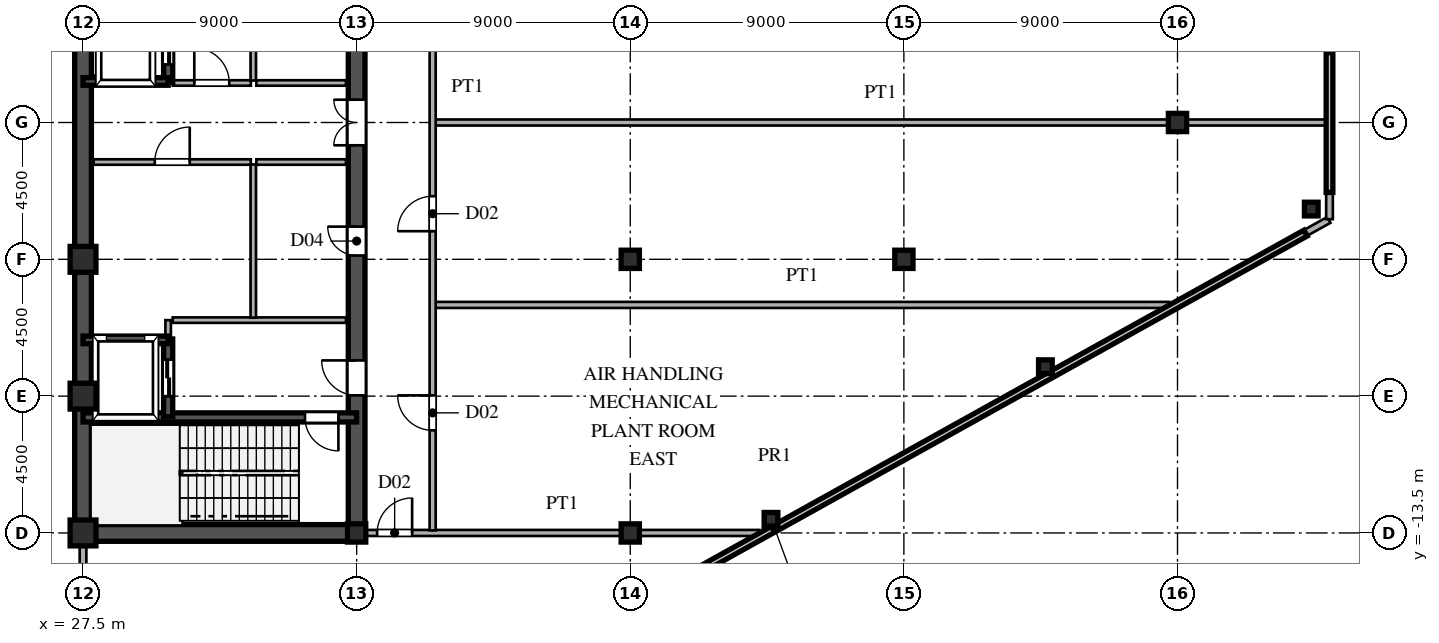
"""IFC4 building model, lengths in metres.
Left out: names, types, materials, properties, quantities, classifications, styles, units other than length and angle.
Written with IfcOpenShell. Run it as: python <this file> out.ifc"""

import sys

from ifc_helpers import new_model, si_unit, direction, frame, frame_2d, origin, origin_2d, place, context, subcontext, project, spatial, rectangle, hollow_rectangle, i_section, extrude, source, transform, mapped, element, fill, save


model = new_model("IFC4")
c1 = context("Model", 3, precision=1e-05, world=origin(), true_north=direction((0.0, 1.0)))
c2 = subcontext(c1, "Body", "Model", "MODEL_VIEW")
j1 = project(units=[si_unit("LENGTHUNIT", "METRE"), si_unit("PLANEANGLEUNIT", "RADIAN")], contexts=[c1])
p1 = place(None, origin())
s1 = spatial("IfcSite", under=j1, at=p1, CompositionType="ELEMENT")
p2 = place(p1, origin())
s2 = spatial("IfcBuilding", under=s1, at=p2, CompositionType="ELEMENT")
p3 = place(p2, frame((0.0, 0.0, 162.0)))
s3 = spatial("IfcBuildingStorey", under=s2, at=p3, CompositionType="ELEMENT", Elevation=162.0)
m1 = source(origin(), c2, "Body", "SweptSolid", [
    extrude(hollow_rectangle(XDim=0.85, YDim=0.85, WallThickness=0.036, at=origin_2d()), origin(), (0.0, 0.0, 1.0), 5.1),
])
for number, where, z_axis, x_axis in (
    (1, (27.5, -13.5, 0.0), (0.0, 0.0, 1.0), (1.0, 0.0, 0.0)),
    (2, (27.5, -9.0, 0.0), (0.0, 0.0, 1.0), (1.0, 0.0, 0.0)),
    (3, (27.5, -4.5, 0.0), (0.0, 0.0, 1.0), (1.0, 0.0, 0.0)),
):
    element("IfcColumn", number, at=place(p3, frame(where, z_axis=z_axis, x_axis=x_axis)), inside=s3, PredefinedType="COLUMN", context=c2, shape_type="MappedRepresentation", body=[
        mapped(m1, transform((0.0, 0.0, 0.0), scale=1.0)),
    ])
m2 = source(origin(), c2, "Body", "SweptSolid", [
    extrude(i_section(OverallWidth=0.6, OverallDepth=0.6, WebThickness=0.025, FlangeThickness=0.04, at=origin_2d()), origin(), (0.0, 0.0, 1.0), 5.1),
])
for number, where, z_axis, x_axis in (
    (4, (36.5, -13.5, 0.0), (0.0, 0.0, 1.0), (1.0, 0.0, 0.0)),
    (5, (45.5, -13.5, 0.0), (0.0, 0.0, 1.0), (1.0, 0.0, 0.0)),
    (6, (45.5, -4.5, 0.0), (0.0, 0.0, 1.0), (1.0, 0.0, 0.0)),
    (7, (54.5, -4.5, 0.0), (0.0, 0.0, 1.0), (1.0, 0.0, 0.0)),
    (8, (63.5, 0.0, 0.0), (0.0, 0.0, 1.0), (1.0, 0.0, 0.0)),
):
    element("IfcColumn", number, at=place(p3, frame(where, z_axis=z_axis, x_axis=x_axis)), inside=s3, PredefinedType="COLUMN", context=c2, shape_type="MappedRepresentation", body=[
        mapped(m2, transform((0.0, 0.0, 0.0), scale=1.0)),
    ])
m3 = source(origin(), c2, "Body", "SweptSolid", [
    extrude(hollow_rectangle(XDim=0.45, YDim=0.45, WallThickness=0.018, at=origin_2d()), origin(), (0.0, 0.0, 1.0), 5.1),
])
for number, where, z_axis, x_axis in (
    (9, (67.9, -2.847, 0.0), (0.0, 0.0, 1.0), (1.0, 0.0, 0.0)),
    (10, (50.129, -13.051, 0.0), (0.0, 0.0, 1.0), (1.0, 0.0, 0.0)),
    (11, (59.155, -8.031, 0.0), (0.0, 0.0, 1.0), (1.0, 0.0, 0.0)),
):
    element("IfcColumn", number, at=place(p3, frame(where, z_axis=z_axis, x_axis=x_axis)), inside=s3, PredefinedType="COLUMN", context=c2, shape_type="MappedRepresentation", body=[
        mapped(m3, transform((0.0, 0.0, 0.0), scale=1.0)),
    ])
p4 = place(p3, frame((32.018, -23.49, 0.0), z_axis=(0.0, 0.0, 1.0), x_axis=(0.873930586172, 0.486050748947, 0.0)))
e12 = element("IfcWall", 12, at=p4, inside=s3, PredefinedType="PARAPET", context=c2, shape_type="SweptSolid", body=[
    extrude(rectangle(XDim=41.725, YDim=0.22, at=frame_2d((20.863, 0.0))), origin(), (0.0, 0.0, 1.0), 1.25),
])
p5 = place(p3, frame((68.5, -3.18, 0.0), z_axis=(0.0, 0.0, 1.0), x_axis=(0.0, 1.0, 0.0)))
e13 = element("IfcWall", 13, at=p5, inside=s3, PredefinedType="PARAPET", context=c2, shape_type="SweptSolid", body=[
    extrude(rectangle(XDim=6.36, YDim=0.22, at=frame_2d((3.18, 0.0))), origin(), (0.0, 0.0, 1.0), 1.25),
])
p6 = place(p3, frame((27.5, -17.98, 0.0), z_axis=(0.0, 0.0, 1.0), x_axis=(0.0, 1.0, 0.0)))
e14 = element("IfcWall", 14, at=p6, inside=s3, PredefinedType="PARAPET", context=c2, shape_type="SweptSolid", body=[
    extrude(rectangle(XDim=4.46, YDim=0.22, at=frame_2d((2.23, 0.0))), origin(), (0.0, 0.0, 1.0), 1.25),
])
for number, where, z_axis, x_axis in (
    (15, (27.5, -13.5, 0.0), (0.0, 0.0, 1.0), (0.0, 1.0, 0.0)),
    (16, (27.5, 1.3, 0.0), (0.0, 0.0, 1.0), (0.0, 1.0, 0.0)),
):
    element("IfcWall", number, at=place(p3, frame(where, z_axis=z_axis, x_axis=x_axis)), inside=s3, PredefinedType="SHEAR", context=c2, shape_type="SweptSolid", body=[
        extrude(rectangle(XDim=12.2, YDim=0.55, at=frame_2d((6.1, 0.0))), origin(), (0.0, 0.0, 1.0), 4.88),
    ])
p7 = place(p3, frame((27.5, -1.3, 0.0), z_axis=(0.0, 0.0, 1.0), x_axis=(0.0, 1.0, 0.0)))
e17 = element("IfcWall", 17, at=p7, inside=s3, PredefinedType="SHEAR", context=c2, shape_type="SweptSolid", body=[
    extrude(rectangle(XDim=2.6, YDim=0.55, at=frame_2d((1.3, 0.0))), origin(), (0.0, 0.0, 1.0), 4.88),
])
p8 = place(p3, frame((27.5, -13.5, 0.0), z_axis=(0.0, 0.0, 1.0), x_axis=(1.0, 0.0, 0.0)))
e18 = element("IfcWall", 18, at=p8, inside=s3, PredefinedType="SHEAR", context=c2, shape_type="SweptSolid", body=[
    extrude(rectangle(XDim=9.0, YDim=0.55, at=frame_2d((4.5, 0.0))), origin(), (0.0, 0.0, 1.0), 4.88),
])
p9 = place(p3, frame((36.5, -13.65, 0.0), z_axis=(0.0, 0.0, 1.0), x_axis=(0.0, 1.0, 0.0)))
e19 = element("IfcWall", 19, at=p9, inside=s3, PredefinedType="SHEAR", context=c2, shape_type="SweptSolid", body=[
    extrude(rectangle(XDim=7.15, YDim=0.55, at=frame_2d((3.575, 0.0))), origin(), (0.0, 0.0, 1.0), 4.88),
])
p10 = place(p9, frame((4.675, 0.0, 0.0)))
e20 = element("IfcOpeningElement", 20, at=p10, cuts=e19, PredefinedType="OPENING", context=c2, shape_type="SweptSolid", body=[
    extrude(rectangle(XDim=1.15, YDim=2.2, at=frame_2d((0.575, 1.1))), frame((0.0, 0.285, 0.0), z_axis=(0.0, -1.0, 0.0), x_axis=(1.0, 0.0, 0.0)), (0.0, 0.0, 1.0), 0.57),
])
p11 = place(p3, frame((36.5, -1.3, 0.0), z_axis=(0.0, 0.0, 1.0), x_axis=(0.0, 1.0, 0.0)))
e21 = element("IfcWall", 21, at=p11, inside=s3, PredefinedType="SHEAR", context=c2, shape_type="SweptSolid", body=[
    extrude(rectangle(XDim=2.6, YDim=0.55, at=frame_2d((1.3, 0.0))), origin(), (0.0, 0.0, 1.0), 4.88),
])
p12 = place(p11, frame((0.55, 0.0, 0.0)))
e22 = element("IfcOpeningElement", 22, at=p12, cuts=e21, PredefinedType="OPENING", context=c2, shape_type="SweptSolid", body=[
    extrude(rectangle(XDim=1.5, YDim=2.3, at=frame_2d((0.75, 1.15))), frame((0.0, 0.285, 0.0), z_axis=(0.0, -1.0, 0.0), x_axis=(1.0, 0.0, 0.0)), (0.0, 0.0, 1.0), 0.57),
])
p13 = place(p3, frame((36.5, -6.5, 0.0), z_axis=(0.0, 0.0, 1.0), x_axis=(0.0, 1.0, 0.0)))
e23 = element("IfcWall", 23, at=p13, inside=s3, PredefinedType="SHEAR", context=c2, shape_type="SweptSolid", body=[
    extrude(rectangle(XDim=5.2, YDim=0.55, at=frame_2d((2.6, 0.0))), origin(), (0.0, 0.0, 1.0), 4.88),
])
p14 = place(p13, frame((2.125, 0.0, 0.0)))
e24 = element("IfcOpeningElement", 24, at=p14, cuts=e23, PredefinedType="OPENING", context=c2, shape_type="SweptSolid", body=[
    extrude(rectangle(XDim=0.95, YDim=2.15, at=frame_2d((0.475, 1.075))), frame((0.0, 0.285, 0.0), z_axis=(0.0, -1.0, 0.0), x_axis=(1.0, 0.0, 0.0)), (0.0, 0.0, 1.0), 0.57),
])
p15 = place(p3, frame((36.5, 1.3, 0.0), z_axis=(0.0, 0.0, 1.0), x_axis=(0.0, 1.0, 0.0)))
e25 = element("IfcWall", 25, at=p15, inside=s3, PredefinedType="SHEAR", context=c2, shape_type="SweptSolid", body=[
    extrude(rectangle(XDim=6.9, YDim=0.55, at=frame_2d((3.45, 0.0))), origin(), (0.0, 0.0, 1.0), 4.88),
])
p16 = place(p15, frame((2.975, 0.0, 0.0)))
e26 = element("IfcOpeningElement", 26, at=p16, cuts=e25, PredefinedType="OPENING", context=c2, shape_type="SweptSolid", body=[
    extrude(rectangle(XDim=0.95, YDim=2.15, at=frame_2d((0.475, 1.075))), frame((0.0, 0.285, 0.0), z_axis=(0.0, -1.0, 0.0), x_axis=(1.0, 0.0, 0.0)), (0.0, 0.0, 1.0), 0.57),
])
p17 = place(p3, frame((27.5, -9.7, 0.0), z_axis=(0.0, 0.0, 1.0), x_axis=(1.0, 0.0, 0.0)))
e27 = element("IfcWall", 27, at=p17, inside=s3, PredefinedType="SHEAR", context=c2, shape_type="SweptSolid", body=[
    extrude(rectangle(XDim=9.0, YDim=0.3, at=frame_2d((4.5, 0.0))), origin(), (0.0, 0.0, 1.0), 4.88),
])
p18 = place(p17, frame((7.3, 0.0, 0.0)))
e28 = element("IfcOpeningElement", 28, at=p18, cuts=e27, PredefinedType="OPENING", context=c2, shape_type="SweptSolid", body=[
    extrude(rectangle(XDim=1.1, YDim=2.2, at=frame_2d((0.55, 1.1))), frame((0.0, 0.16, 0.0), z_axis=(0.0, -1.0, 0.0), x_axis=(1.0, 0.0, 0.0)), (0.0, 0.0, 1.0), 0.32),
])
for number, where, z_axis, x_axis in (
    (29, (27.5, -7.15, 0.0), (0.0, 0.0, 1.0), (1.0, 0.0, 0.0)),
    (30, (27.5, 1.35, 0.0), (0.0, 0.0, 1.0), (1.0, 0.0, 0.0)),
):
    element("IfcWall", number, at=place(p3, frame(where, z_axis=z_axis, x_axis=x_axis)), inside=s3, PredefinedType="SHEAR", context=c2, shape_type="SweptSolid", body=[
        extrude(rectangle(XDim=2.8, YDim=0.25, at=frame_2d((1.4, 0.0))), origin(), (0.0, 0.0, 1.0), 4.88),
    ])
p19 = place(p3, frame((30.3, -9.68, 0.0), z_axis=(0.0, 0.0, 1.0), x_axis=(0.0, 1.0, 0.0)))
e31 = element("IfcWall", 31, at=p19, inside=s3, PredefinedType="SHEAR", context=c2, shape_type="SweptSolid", body=[
    extrude(rectangle(XDim=2.56, YDim=0.3, at=frame_2d((1.28, 0.0))), origin(), (0.0, 0.0, 1.0), 4.88),
])
p20 = place(p19, frame((0.68, 0.0, 0.0)))
e32 = element("IfcOpeningElement", 32, at=p20, cuts=e31, PredefinedType="OPENING", context=c2, shape_type="SweptSolid", body=[
    extrude(rectangle(XDim=1.2, YDim=2.25, at=frame_2d((0.6, 1.125))), frame((0.0, 0.16, 0.0), z_axis=(0.0, -1.0, 0.0), x_axis=(1.0, 0.0, 0.0)), (0.0, 0.0, 1.0), 0.32),
])
p21 = place(p3, frame((30.3, 1.32, 0.0), z_axis=(0.0, 0.0, 1.0), x_axis=(0.0, 1.0, 0.0)))
e33 = element("IfcWall", 33, at=p21, inside=s3, PredefinedType="SHEAR", context=c2, shape_type="SweptSolid", body=[
    extrude(rectangle(XDim=2.28, YDim=0.3, at=frame_2d((1.14, 0.0))), origin(), (0.0, 0.0, 1.0), 4.88),
])
p22 = place(p21, frame((0.59, 0.0, 0.0)))
e34 = element("IfcOpeningElement", 34, at=p22, cuts=e33, PredefinedType="OPENING", context=c2, shape_type="SweptSolid", body=[
    extrude(rectangle(XDim=1.1, YDim=2.2, at=frame_2d((0.55, 1.1))), frame((0.0, 0.16, 0.0), z_axis=(0.0, -1.0, 0.0), x_axis=(1.0, 0.0, 0.0)), (0.0, 0.0, 1.0), 0.32),
])
p23 = place(p3, frame((30.45, -6.5, 0.0), z_axis=(0.0, 0.0, 1.0), x_axis=(1.0, 0.0, 0.0)))
e35 = element("IfcWall", 35, at=p23, inside=s3, PredefinedType="PARTITIONING", context=c2, shape_type="SweptSolid", body=[
    extrude(rectangle(XDim=5.7, YDim=0.18, at=frame_2d((2.85, 0.0))), origin(), (0.0, 0.0, 1.0), 4.88),
])
p24 = place(p3, frame((30.3, -7.12, 0.0), z_axis=(0.0, 0.0, 1.0), x_axis=(0.0, 1.0, 0.0)))
e36 = element("IfcWall", 36, at=p24, inside=s3, PredefinedType="PARTITIONING", context=c2, shape_type="SweptSolid", body=[
    extrude(rectangle(XDim=0.62, YDim=0.18, at=frame_2d((0.31, 0.0))), origin(), (0.0, 0.0, 1.0), 4.88),
])
p25 = place(p3, frame((33.1, -6.42, 0.0), z_axis=(0.0, 0.0, 1.0), x_axis=(0.0, 1.0, 0.0)))
e37 = element("IfcWall", 37, at=p25, inside=s3, PredefinedType="PARTITIONING", context=c2, shape_type="SweptSolid", body=[
    extrude(rectangle(XDim=5.04, YDim=0.18, at=frame_2d((2.52, 0.0))), origin(), (0.0, 0.0, 1.0), 4.88),
])
p26 = place(p3, frame((33.1, 1.38, 0.0), z_axis=(0.0, 0.0, 1.0), x_axis=(0.0, 1.0, 0.0)))
e38 = element("IfcWall", 38, at=p26, inside=s3, PredefinedType="PARTITIONING", context=c2, shape_type="SweptSolid", body=[
    extrude(rectangle(XDim=6.74, YDim=0.18, at=frame_2d((3.37, 0.0))), origin(), (0.0, 0.0, 1.0), 4.88),
])
p27 = place(p3, frame((27.85, -1.3, 0.0), z_axis=(0.0, 0.0, 1.0), x_axis=(1.0, 0.0, 0.0)))
e39 = element("IfcWall", 39, at=p27, inside=s3, PredefinedType="PARTITIONING", context=c2, shape_type="SweptSolid", body=[
    extrude(rectangle(XDim=5.17, YDim=0.18, at=frame_2d((2.585, 0.0))), origin(), (0.0, 0.0, 1.0), 4.88),
])
p28 = place(p27, frame((2.01, 0.0, 0.0)))
e40 = element("IfcOpeningElement", 40, at=p28, cuts=e39, PredefinedType="OPENING", context=c2, shape_type="SweptSolid", body=[
    extrude(rectangle(XDim=1.15, YDim=2.2, at=frame_2d((0.575, 1.1))), frame((0.0, 0.1, 0.0), z_axis=(0.0, -1.0, 0.0), x_axis=(1.0, 0.0, 0.0)), (0.0, 0.0, 1.0), 0.2),
])
p29 = place(p3, frame((30.45, 1.3, 0.0), z_axis=(0.0, 0.0, 1.0), x_axis=(1.0, 0.0, 0.0)))
e41 = element("IfcWall", 41, at=p29, inside=s3, PredefinedType="PARTITIONING", context=c2, shape_type="SweptSolid", body=[
    extrude(rectangle(XDim=2.57, YDim=0.18, at=frame_2d((1.285, 0.0))), origin(), (0.0, 0.0, 1.0), 4.88),
])
p30 = place(p29, frame((0.71, 0.0, 0.0)))
e42 = element("IfcOpeningElement", 42, at=p30, cuts=e41, PredefinedType="OPENING", context=c2, shape_type="SweptSolid", body=[
    extrude(rectangle(XDim=1.15, YDim=2.2, at=frame_2d((0.575, 1.1))), frame((0.0, 0.1, 0.0), z_axis=(0.0, -1.0, 0.0), x_axis=(1.0, 0.0, 0.0)), (0.0, 0.0, 1.0), 0.2),
])
for number, where, z_axis, x_axis in (
    (43, (33.2, -1.3, 0.0), (0.0, 0.0, 1.0), (1.0, 0.0, 0.0)),
    (44, (33.2, 1.3, 0.0), (0.0, 0.0, 1.0), (1.0, 0.0, 0.0)),
):
    element("IfcWall", number, at=place(p3, frame(where, z_axis=z_axis, x_axis=x_axis)), inside=s3, PredefinedType="PARTITIONING", context=c2, shape_type="SweptSolid", body=[
        extrude(rectangle(XDim=2.95, YDim=0.18, at=frame_2d((1.475, 0.0))), origin(), (0.0, 0.0, 1.0), 4.88),
    ])
p31 = place(p3, frame((36.78, -13.5, 0.0), z_axis=(0.0, 0.0, 1.0), x_axis=(1.0, 0.0, 0.0)))
e45 = element("IfcWall", 45, at=p31, inside=s3, PredefinedType="PARTITIONING", context=c2, shape_type="SweptSolid", body=[
    extrude(rectangle(XDim=10.807, YDim=0.2, at=frame_2d((5.404, 0.0))), origin(), (0.0, 0.0, 1.0), 4.28),
])
p32 = place(p31, frame((0.395, 0.0, 0.0)))
e46 = element("IfcOpeningElement", 46, at=p32, cuts=e45, PredefinedType="OPENING", context=c2, shape_type="SweptSolid", body=[
    extrude(rectangle(XDim=1.15, YDim=2.2, at=frame_2d((0.575, 1.1))), frame((0.0, 0.11, 0.0), z_axis=(0.0, -1.0, 0.0), x_axis=(1.0, 0.0, 0.0)), (0.0, 0.0, 1.0), 0.22),
])
p33 = place(p3, frame((47.587, -13.5, 0.0), z_axis=(0.0, 0.0, 1.0), x_axis=(1.0, 0.0, 0.0)))
e47 = element("IfcWall", 47, at=p33, inside=s3, PredefinedType="PARTITIONING", context=c2, shape_type="SweptSolid", body=[
    extrude(rectangle(XDim=2.156, YDim=0.2, at=frame_2d((1.078, 0.0))), origin(), (0.0, 0.0, 1.0), 4.88),
])
p34 = place(p3, frame((39.085, -6.0, 0.0), z_axis=(0.0, 0.0, 1.0), x_axis=(1.0, 0.0, 0.0)))
e48 = element("IfcWall", 48, at=p34, inside=s3, PredefinedType="PARTITIONING", context=c2, shape_type="SweptSolid", body=[
    extrude(rectangle(XDim=24.144, YDim=0.2, at=frame_2d((12.072, 0.0))), origin(), (0.0, 0.0, 1.0), 4.88),
])
p35 = place(p3, frame((39.085, 0.0, 0.0), z_axis=(0.0, 0.0, 1.0), x_axis=(1.0, 0.0, 0.0)))
e49 = element("IfcWall", 49, at=p35, inside=s3, PredefinedType="PARTITIONING", context=c2, shape_type="SweptSolid", body=[
    extrude(rectangle(XDim=29.3, YDim=0.2, at=frame_2d((14.65, 0.0))), origin(), (0.0, 0.0, 1.0), 4.88),
])
p36 = place(p3, frame((39.0, -13.415, 0.0), z_axis=(0.0, 0.0, 1.0), x_axis=(0.0, 1.0, 0.0)))
e50 = element("IfcWall", 50, at=p36, inside=s3, PredefinedType="PARTITIONING", context=c2, shape_type="SweptSolid", body=[
    extrude(rectangle(XDim=26.83, YDim=0.2, at=frame_2d((13.415, 0.0))), origin(), (0.0, 0.0, 1.0), 4.88),
])
p37 = place(p36, frame((3.29, 0.0, 0.0)))
e51 = element("IfcOpeningElement", 51, at=p37, cuts=e50, PredefinedType="OPENING", context=c2, shape_type="SweptSolid", body=[
    extrude(rectangle(XDim=1.15, YDim=2.2, at=frame_2d((0.575, 1.1))), frame((0.0, 0.11, 0.0), z_axis=(0.0, -1.0, 0.0), x_axis=(1.0, 0.0, 0.0)), (0.0, 0.0, 1.0), 0.22),
])
p38 = place(p36, frame((9.84, 0.0, 0.0)))
e52 = element("IfcOpeningElement", 52, at=p38, cuts=e50, PredefinedType="OPENING", context=c2, shape_type="SweptSolid", body=[
    extrude(rectangle(XDim=1.15, YDim=2.2, at=frame_2d((0.575, 1.1))), frame((0.0, 0.11, 0.0), z_axis=(0.0, -1.0, 0.0), x_axis=(1.0, 0.0, 0.0)), (0.0, 0.0, 1.0), 0.22),
])
p39 = place(p36, frame((16.09, 0.0, 0.0)))
e53 = element("IfcOpeningElement", 53, at=p39, cuts=e50, PredefinedType="OPENING", context=c2, shape_type="SweptSolid", body=[
    extrude(rectangle(XDim=1.15, YDim=2.2, at=frame_2d((0.575, 1.1))), frame((0.0, 0.11, 0.0), z_axis=(0.0, -1.0, 0.0), x_axis=(1.0, 0.0, 0.0)), (0.0, 0.0, 1.0), 0.22),
])
p40 = place(p36, frame((22.64, 0.0, 0.0)))
e54 = element("IfcOpeningElement", 54, at=p40, cuts=e50, PredefinedType="OPENING", context=c2, shape_type="SweptSolid", body=[
    extrude(rectangle(XDim=1.15, YDim=2.2, at=frame_2d((0.575, 1.1))), frame((0.0, 0.11, 0.0), z_axis=(0.0, -1.0, 0.0), x_axis=(1.0, 0.0, 0.0)), (0.0, 0.0, 1.0), 0.22),
])
m4 = source(origin(), c2, "Body", "SweptSolid", [
    extrude(rectangle(XDim=1.15, YDim=2.2, at=frame_2d((0.575, 1.1))), frame((0.0, 0.025, 0.0), z_axis=(0.0, -1.0, 0.0), x_axis=(1.0, 0.0, 0.0)), (0.0, 0.0, 1.0), 0.05),
])
p41 = place(p10, origin())
e55 = element("IfcDoor", 55, at=p41, inside=s3, OperationType="SINGLE_SWING_RIGHT", PredefinedType="DOOR", context=c2, shape_type="MappedRepresentation", body=[
    mapped(m4, transform((0.0, 0.0, 0.0), scale=1.0)),
])
fill(e20, e55)
m5 = source(origin(), c2, "Body", "SweptSolid", [
    extrude(rectangle(XDim=1.5, YDim=2.3, at=frame_2d((0.75, 1.15))), frame((0.0, 0.025, 0.0), z_axis=(0.0, -1.0, 0.0), x_axis=(1.0, 0.0, 0.0)), (0.0, 0.0, 1.0), 0.05),
])
p42 = place(p12, origin())
e56 = element("IfcDoor", 56, at=p42, inside=s3, OperationType="DOUBLE_SWING_LEFT", PredefinedType="DOOR", context=c2, shape_type="MappedRepresentation", body=[
    mapped(m5, transform((0.0, 0.0, 0.0), scale=1.0)),
])
fill(e22, e56)
m6 = source(origin(), c2, "Body", "SweptSolid", [
    extrude(rectangle(XDim=0.95, YDim=2.15, at=frame_2d((0.475, 1.075))), frame((0.0, 0.025, 0.0), z_axis=(0.0, -1.0, 0.0), x_axis=(1.0, 0.0, 0.0)), (0.0, 0.0, 1.0), 0.05),
])
p43 = place(p14, origin())
e57 = element("IfcDoor", 57, at=p43, inside=s3, OperationType="SINGLE_SWING_RIGHT", PredefinedType="DOOR", context=c2, shape_type="MappedRepresentation", body=[
    mapped(m6, transform((0.0, 0.0, 0.0), scale=1.0)),
])
fill(e24, e57)
m7 = source(origin(), c2, "Body", "SweptSolid", [
    extrude(rectangle(XDim=1.1, YDim=2.2, at=frame_2d((0.55, 1.1))), frame((0.0, 0.025, 0.0), z_axis=(0.0, -1.0, 0.0), x_axis=(1.0, 0.0, 0.0)), (0.0, 0.0, 1.0), 0.05),
])
p44 = place(p18, frame((1.1, 0.0, 0.0), z_axis=(0.0, 0.0, 1.0), x_axis=(-1.0, 0.0, 0.0)))
e58 = element("IfcDoor", 58, at=p44, inside=s3, OperationType="SINGLE_SWING_RIGHT", PredefinedType="DOOR", context=c2, shape_type="MappedRepresentation", body=[
    mapped(m7, transform((0.0, 0.0, 0.0), scale=1.0)),
])
fill(e28, e58)
m8 = source(origin(), c2, "Body", "SweptSolid", [
    extrude(rectangle(XDim=1.2, YDim=2.25, at=frame_2d((0.6, 1.125))), frame((0.0, 0.025, 0.0), z_axis=(0.0, -1.0, 0.0), x_axis=(1.0, 0.0, 0.0)), (0.0, 0.0, 1.0), 0.05),
])
p45 = place(p20, origin())
e59 = element("IfcDoor", 59, at=p45, inside=s3, OperationType="DOUBLE_DOOR_SLIDING", PredefinedType="DOOR", context=c2, shape_type="MappedRepresentation", body=[
    mapped(m8, transform((0.0, 0.0, 0.0), scale=1.0)),
])
fill(e32, e59)
m9 = source(origin(), c2, "Body", "SweptSolid", [
    extrude(rectangle(XDim=1.1, YDim=2.2, at=frame_2d((0.55, 1.1))), frame((0.0, 0.025, 0.0), z_axis=(0.0, -1.0, 0.0), x_axis=(1.0, 0.0, 0.0)), (0.0, 0.0, 1.0), 0.05),
])
p46 = place(p22, origin())
e60 = element("IfcDoor", 60, at=p46, inside=s3, OperationType="DOUBLE_DOOR_SLIDING", PredefinedType="DOOR", context=c2, shape_type="MappedRepresentation", body=[
    mapped(m9, transform((0.0, 0.0, 0.0), scale=1.0)),
])
fill(e34, e60)
p47 = place(p28, origin())
e61 = element("IfcDoor", 61, at=p47, inside=s3, OperationType="SINGLE_SWING_RIGHT", PredefinedType="DOOR", context=c2, shape_type="MappedRepresentation", body=[
    mapped(m4, transform((0.0, 0.0, 0.0), scale=1.0)),
])
fill(e40, e61)
p48 = place(p30, origin())
e62 = element("IfcDoor", 62, at=p48, inside=s3, OperationType="SINGLE_SWING_LEFT", PredefinedType="DOOR", context=c2, shape_type="MappedRepresentation", body=[
    mapped(m4, transform((0.0, 0.0, 0.0), scale=1.0)),
])
fill(e42, e62)
p49 = place(p32, origin())
e63 = element("IfcDoor", 63, at=p49, inside=s3, OperationType="SINGLE_SWING_RIGHT", PredefinedType="DOOR", context=c2, shape_type="MappedRepresentation", body=[
    mapped(m4, transform((0.0, 0.0, 0.0), scale=1.0)),
])
fill(e46, e63)
p50 = place(p37, origin())
e64 = element("IfcDoor", 64, at=p50, inside=s3, OperationType="SINGLE_SWING_RIGHT", PredefinedType="DOOR", context=c2, shape_type="MappedRepresentation", body=[
    mapped(m4, transform((0.0, 0.0, 0.0), scale=1.0)),
])
fill(e51, e64)
p51 = place(p38, origin())
e65 = element("IfcDoor", 65, at=p51, inside=s3, OperationType="SINGLE_SWING_LEFT", PredefinedType="DOOR", context=c2, shape_type="MappedRepresentation", body=[
    mapped(m4, transform((0.0, 0.0, 0.0), scale=1.0)),
])
fill(e52, e65)
save(model, sys.argv[1])
